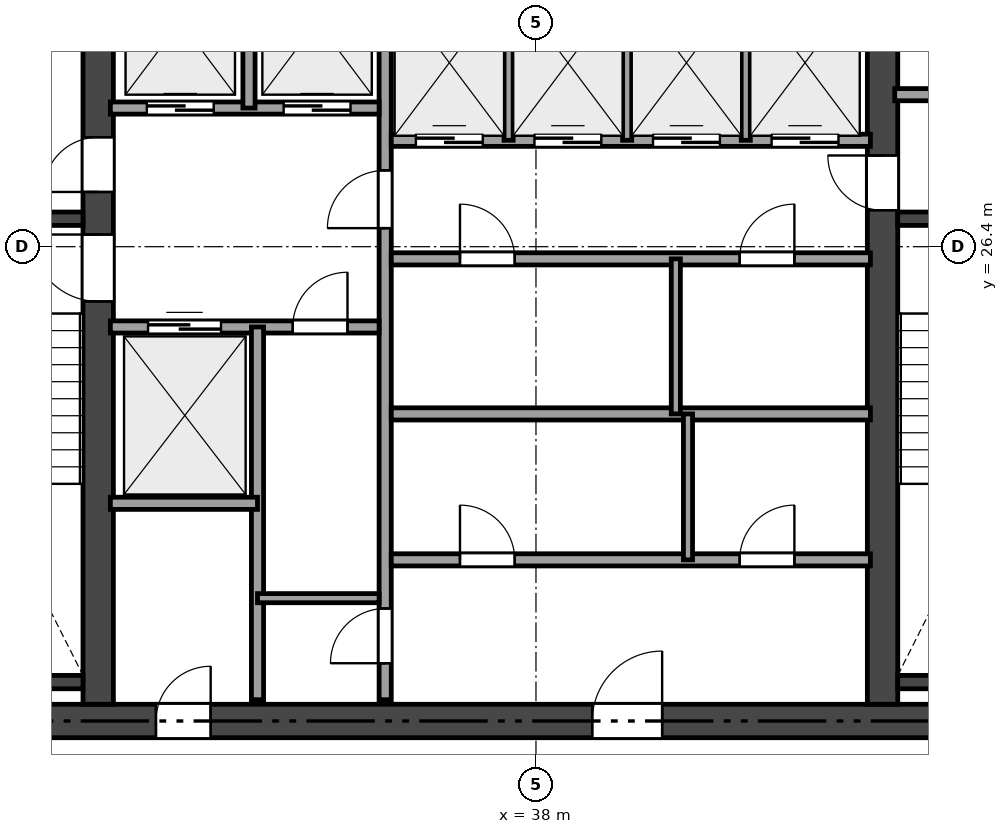
"""IFC4 building model, lengths in metres.
Left out: names, types, materials, properties, quantities, classifications, styles, units other than length and angle.
Written with IfcOpenShell. Run it as: python <this file> out.ifc"""

import sys

from ifc_helpers import new_model, si_unit, direction, frame, frame_2d, origin, place, context, subcontext, project, spatial, rectangle, extrude, element, fill, save


model = new_model("IFC4")
c1 = context("Model", 3, precision=1e-05, world=origin(), true_north=direction((0.0, 1.0)))
c2 = subcontext(c1, "Body", "Model", "MODEL_VIEW")
j1 = project(units=[si_unit("LENGTHUNIT", "METRE"), si_unit("PLANEANGLEUNIT", "RADIAN")], contexts=[c1])
p1 = place(None, origin())
s1 = spatial("IfcSite", under=j1, at=p1, CompositionType="ELEMENT")
p2 = place(p1, origin())
s2 = spatial("IfcBuilding", under=s1, at=p2, CompositionType="ELEMENT")
p3 = place(p2, frame((0.0, 0.0, 228.3)))
s3 = spatial("IfcBuildingStorey", under=s2, at=p3, CompositionType="ELEMENT", Elevation=228.3)
p4 = place(p3, frame((26.525, 18.6, 0.0), z_axis=(0.0, 0.0, 1.0), x_axis=(1.0, 0.0, 0.0)))
e1 = element("IfcWall", 1, at=p4, inside=s3, PredefinedType="SHEAR", context=c2, shape_type="SweptSolid", body=[
    extrude(rectangle(XDim=21.35, YDim=0.55, at=frame_2d((10.675, 0.0))), origin(), (0.0, 0.0, 1.0), 3.24),
])
p5 = place(p4, frame((12.4, 0.0, 0.0)))
e2 = element("IfcOpeningElement", 2, at=p5, cuts=e1, PredefinedType="OPENING", context=c2, shape_type="SweptSolid", body=[
    extrude(rectangle(XDim=1.15, YDim=2.15, at=frame_2d((0.575, 1.075))), frame((0.0, 0.285, 0.0), z_axis=(0.0, -1.0, 0.0), x_axis=(1.0, 0.0, 0.0)), (0.0, 0.0, 1.0), 0.57),
])
p6 = place(p4, frame((5.225, 0.0, 0.0)))
e3 = element("IfcOpeningElement", 3, at=p6, cuts=e1, PredefinedType="OPENING", context=c2, shape_type="SweptSolid", body=[
    extrude(rectangle(XDim=0.9, YDim=2.1, at=frame_2d((0.45, 1.05))), frame((0.0, 0.285, 0.0), z_axis=(0.0, -1.0, 0.0), x_axis=(1.0, 0.0, 0.0)), (0.0, 0.0, 1.0), 0.57),
])
p7 = place(p3, frame((30.8, 18.875, 0.0), z_axis=(0.0, 0.0, 1.0), x_axis=(0.0, 1.0, 0.0)))
e4 = element("IfcWall", 4, at=p7, inside=s3, PredefinedType="SHEAR", context=c2, shape_type="SweptSolid", body=[
    extrude(rectangle(XDim=15.05, YDim=0.5, at=frame_2d((7.525, 0.0))), origin(), (0.0, 0.0, 1.0), 3.24),
])
p8 = place(p7, frame((6.625, 0.0, 0.0)))
e5 = element("IfcOpeningElement", 5, at=p8, cuts=e4, PredefinedType="OPENING", context=c2, shape_type="SweptSolid", body=[
    extrude(rectangle(XDim=1.1, YDim=2.15, at=frame_2d((0.55, 1.075))), frame((0.0, 0.26, 0.0), z_axis=(0.0, -1.0, 0.0), x_axis=(1.0, 0.0, 0.0)), (0.0, 0.0, 1.0), 0.52),
])
p9 = place(p7, frame((8.425, 0.0, 0.0)))
e6 = element("IfcOpeningElement", 6, at=p9, cuts=e4, PredefinedType="OPENING", context=c2, shape_type="SweptSolid", body=[
    extrude(rectangle(XDim=0.9, YDim=2.1, at=frame_2d((0.45, 1.05))), frame((0.0, 0.26, 0.0), z_axis=(0.0, -1.0, 0.0), x_axis=(1.0, 0.0, 0.0)), (0.0, 0.0, 1.0), 0.52),
])
p10 = place(p3, frame((43.7, 18.875, 0.0), z_axis=(0.0, 0.0, 1.0), x_axis=(0.0, 1.0, 0.0)))
e7 = element("IfcWall", 7, at=p10, inside=s3, PredefinedType="SHEAR", context=c2, shape_type="SweptSolid", body=[
    extrude(rectangle(XDim=15.05, YDim=0.5, at=frame_2d((7.525, 0.0))), origin(), (0.0, 0.0, 1.0), 3.24),
])
p11 = place(p10, frame((8.125, 0.0, 0.0)))
e8 = element("IfcOpeningElement", 8, at=p11, cuts=e7, PredefinedType="OPENING", context=c2, shape_type="SweptSolid", body=[
    extrude(rectangle(XDim=0.9, YDim=2.1, at=frame_2d((0.45, 1.05))), frame((0.0, 0.26, 0.0), z_axis=(0.0, -1.0, 0.0), x_axis=(1.0, 0.0, 0.0)), (0.0, 0.0, 1.0), 0.52),
])
for number, where, z_axis, x_axis in (
    (9, (27.075, 26.86, 0.0), (0.0, 0.0, 1.0), (1.0, 0.0, 0.0)),
    (10, (27.075, 19.24, 0.0), (0.0, 0.0, 1.0), (1.0, 0.0, 0.0)),
):
    element("IfcWall", number, at=place(p3, frame(where, z_axis=z_axis, x_axis=x_axis)), inside=s3, PredefinedType="SHEAR", context=c2, shape_type="SweptSolid", body=[
        extrude(rectangle(XDim=3.475, YDim=0.22, at=frame_2d((1.738, 0.0))), origin(), (0.0, 0.0, 1.0), 3.24),
    ])
for number, where, z_axis, x_axis in (
    (11, (43.95, 26.86, 0.0), (0.0, 0.0, 1.0), (1.0, 0.0, 0.0)),
    (12, (43.95, 19.24, 0.0), (0.0, 0.0, 1.0), (1.0, 0.0, 0.0)),
):
    element("IfcWall", number, at=place(p3, frame(where, z_axis=z_axis, x_axis=x_axis)), inside=s3, PredefinedType="SHEAR", context=c2, shape_type="SweptSolid", body=[
        extrude(rectangle(XDim=3.375, YDim=0.22, at=frame_2d((1.688, 0.0))), origin(), (0.0, 0.0, 1.0), 3.24),
    ])
p12 = place(p3, frame((43.9, 28.9, 0.0), z_axis=(0.0, 0.0, 1.0), x_axis=(1.0, 0.0, 0.0)))
e13 = element("IfcWall", 13, at=p12, inside=s3, PredefinedType="SOLIDWALL", context=c2, shape_type="SweptSolid", body=[
    extrude(rectangle(XDim=3.35, YDim=0.2, at=frame_2d((1.675, 0.0))), origin(), (0.0, 0.0, 1.0), 3.24),
])
p13 = place(p12, frame((1.15, 0.0, 0.0)))
e14 = element("IfcOpeningElement", 14, at=p13, cuts=e13, PredefinedType="OPENING", context=c2, shape_type="SweptSolid", body=[
    extrude(rectangle(XDim=0.9, YDim=2.1, at=frame_2d((0.45, 1.05))), frame((0.0, 0.11, 0.0), z_axis=(0.0, -1.0, 0.0), x_axis=(1.0, 0.0, 0.0)), (0.0, 0.0, 1.0), 0.22),
])
p14 = place(p3, frame((35.52, 18.95, 0.0), z_axis=(0.0, 0.0, 1.0), x_axis=(0.0, 1.0, 0.0)))
e15 = element("IfcWall", 15, at=p14, inside=s3, PredefinedType="SOLIDWALL", context=c2, shape_type="SweptSolid", body=[
    extrude(rectangle(XDim=14.9, YDim=0.2, at=frame_2d((7.45, 0.0))), origin(), (0.0, 0.0, 1.0), 2.761),
])
p15 = place(p14, frame((7.755, 0.0, 0.0)))
e16 = element("IfcOpeningElement", 16, at=p15, cuts=e15, PredefinedType="OPENING", context=c2, shape_type="SweptSolid", body=[
    extrude(rectangle(XDim=0.95, YDim=2.15, at=frame_2d((0.475, 1.075))), frame((0.0, 0.11, 0.0), z_axis=(0.0, -1.0, 0.0), x_axis=(1.0, 0.0, 0.0)), (0.0, 0.0, 1.0), 0.22),
])
p16 = place(p14, frame((0.6, 0.0, 0.0)))
e17 = element("IfcOpeningElement", 17, at=p16, cuts=e15, PredefinedType="OPENING", context=c2, shape_type="SweptSolid", body=[
    extrude(rectangle(XDim=0.9, YDim=2.1, at=frame_2d((0.45, 1.05))), frame((0.0, 0.11, 0.0), z_axis=(0.0, -1.0, 0.0), x_axis=(1.0, 0.0, 0.0)), (0.0, 0.0, 1.0), 0.22),
])
p17 = place(p3, frame((31.0, 28.68, 0.0), z_axis=(0.0, 0.0, 1.0), x_axis=(1.0, 0.0, 0.0)))
e18 = element("IfcWall", 18, at=p17, inside=s3, PredefinedType="SOLIDWALL", context=c2, shape_type="SweptSolid", body=[
    extrude(rectangle(XDim=4.42, YDim=0.2, at=frame_2d((2.21, 0.0))), origin(), (0.0, 0.0, 1.0), 3.24),
])
p18 = place(p17, frame((0.6, 0.0, 0.0)))
e19 = element("IfcOpeningElement", 19, at=p18, cuts=e18, PredefinedType="OPENING", context=c2, shape_type="SweptSolid", body=[
    extrude(rectangle(XDim=1.1, YDim=2.15, at=frame_2d((0.55, 1.075))), frame((0.0, 0.11, 0.0), z_axis=(0.0, -1.0, 0.0), x_axis=(1.0, 0.0, 0.0)), (0.0, 0.0, 1.0), 0.22),
])
p19 = place(p17, frame((2.85, 0.0, 0.0)))
e20 = element("IfcOpeningElement", 20, at=p19, cuts=e18, PredefinedType="OPENING", context=c2, shape_type="SweptSolid", body=[
    extrude(rectangle(XDim=1.1, YDim=2.15, at=frame_2d((0.55, 1.075))), frame((0.0, 0.11, 0.0), z_axis=(0.0, -1.0, 0.0), x_axis=(1.0, 0.0, 0.0)), (0.0, 0.0, 1.0), 0.22),
])
p20 = place(p3, frame((33.28, 28.68, 0.0), z_axis=(0.0, 0.0, 1.0), x_axis=(0.0, 1.0, 0.0)))
e21 = element("IfcWall", 21, at=p20, inside=s3, PredefinedType="SOLIDWALL", context=c2, shape_type="SweptSolid", body=[
    extrude(rectangle(XDim=2.82, YDim=0.2, at=frame_2d((1.41, 0.0))), origin(), (0.0, 0.0, 1.0), 3.24),
])
p21 = place(p3, frame((31.0, 25.08, 0.0), z_axis=(0.0, 0.0, 1.0), x_axis=(1.0, 0.0, 0.0)))
e22 = element("IfcWall", 22, at=p21, inside=s3, PredefinedType="SOLIDWALL", context=c2, shape_type="SweptSolid", body=[
    extrude(rectangle(XDim=4.42, YDim=0.2, at=frame_2d((2.21, 0.0))), origin(), (0.0, 0.0, 1.0), 3.24),
])
p22 = place(p21, frame((3.0, 0.0, 0.0)))
e23 = element("IfcOpeningElement", 23, at=p22, cuts=e22, PredefinedType="OPENING", context=c2, shape_type="SweptSolid", body=[
    extrude(rectangle(XDim=0.9, YDim=2.1, at=frame_2d((0.45, 1.05))), frame((0.0, 0.11, 0.0), z_axis=(0.0, -1.0, 0.0), x_axis=(1.0, 0.0, 0.0)), (0.0, 0.0, 1.0), 0.22),
])
p23 = place(p21, frame((0.62, 0.0, 0.0)))
e24 = element("IfcOpeningElement", 24, at=p23, cuts=e22, PredefinedType="OPENING", context=c2, shape_type="SweptSolid", body=[
    extrude(rectangle(XDim=1.2, YDim=2.15, at=frame_2d((0.6, 1.075))), frame((0.0, 0.11, 0.0), z_axis=(0.0, -1.0, 0.0), x_axis=(1.0, 0.0, 0.0)), (0.0, 0.0, 1.0), 0.22),
])
p24 = place(p3, frame((33.42, 18.95, 0.0), z_axis=(0.0, 0.0, 1.0), x_axis=(0.0, 1.0, 0.0)))
e25 = element("IfcWall", 25, at=p24, inside=s3, PredefinedType="SOLIDWALL", context=c2, shape_type="SweptSolid", body=[
    extrude(rectangle(XDim=6.13, YDim=0.2, at=frame_2d((3.065, 0.0))), origin(), (0.0, 0.0, 1.0), 2.761),
])
p25 = place(p3, frame((31.0, 22.18, 0.0), z_axis=(0.0, 0.0, 1.0), x_axis=(1.0, 0.0, 0.0)))
e26 = element("IfcWall", 26, at=p25, inside=s3, PredefinedType="SOLIDWALL", context=c2, shape_type="SweptSolid", body=[
    extrude(rectangle(XDim=2.42, YDim=0.2, at=frame_2d((1.21, 0.0))), origin(), (0.0, 0.0, 1.0), 3.24),
])
p26 = place(p3, frame((33.42, 20.62, 0.0), z_axis=(0.0, 0.0, 1.0), x_axis=(1.0, 0.0, 0.0)))
e27 = element("IfcWall", 27, at=p26, inside=s3, PredefinedType="PARTITIONING", context=c2, shape_type="SweptSolid", body=[
    extrude(rectangle(XDim=2.0, YDim=0.15, at=frame_2d((1.0, 0.0))), origin(), (0.0, 0.0, 1.0), 3.24),
])
p27 = place(p3, frame((35.62, 28.15, 0.0), z_axis=(0.0, 0.0, 1.0), x_axis=(1.0, 0.0, 0.0)))
e28 = element("IfcWall", 28, at=p27, inside=s3, PredefinedType="SOLIDWALL", context=c2, shape_type="SweptSolid", body=[
    extrude(rectangle(XDim=7.88, YDim=0.2, at=frame_2d((3.94, 0.0))), origin(), (0.0, 0.0, 1.0), 3.24),
])
p28 = place(p27, frame((0.405, 0.0, 0.0)))
e29 = element("IfcOpeningElement", 29, at=p28, cuts=e28, PredefinedType="OPENING", context=c2, shape_type="SweptSolid", body=[
    extrude(rectangle(XDim=1.1, YDim=2.15, at=frame_2d((0.55, 1.075))), frame((0.0, 0.11, 0.0), z_axis=(0.0, -1.0, 0.0), x_axis=(1.0, 0.0, 0.0)), (0.0, 0.0, 1.0), 0.22),
])
p29 = place(p27, frame((2.355, 0.0, 0.0)))
e30 = element("IfcOpeningElement", 30, at=p29, cuts=e28, PredefinedType="OPENING", context=c2, shape_type="SweptSolid", body=[
    extrude(rectangle(XDim=1.1, YDim=2.15, at=frame_2d((0.55, 1.075))), frame((0.0, 0.11, 0.0), z_axis=(0.0, -1.0, 0.0), x_axis=(1.0, 0.0, 0.0)), (0.0, 0.0, 1.0), 0.22),
])
p30 = place(p27, frame((4.305, 0.0, 0.0)))
e31 = element("IfcOpeningElement", 31, at=p30, cuts=e28, PredefinedType="OPENING", context=c2, shape_type="SweptSolid", body=[
    extrude(rectangle(XDim=1.1, YDim=2.15, at=frame_2d((0.55, 1.075))), frame((0.0, 0.11, 0.0), z_axis=(0.0, -1.0, 0.0), x_axis=(1.0, 0.0, 0.0)), (0.0, 0.0, 1.0), 0.22),
])
p31 = place(p27, frame((6.255, 0.0, 0.0)))
e32 = element("IfcOpeningElement", 32, at=p31, cuts=e28, PredefinedType="OPENING", context=c2, shape_type="SweptSolid", body=[
    extrude(rectangle(XDim=1.1, YDim=2.15, at=frame_2d((0.55, 1.075))), frame((0.0, 0.11, 0.0), z_axis=(0.0, -1.0, 0.0), x_axis=(1.0, 0.0, 0.0)), (0.0, 0.0, 1.0), 0.22),
])
p32 = place(p3, frame((35.62, 26.2, 0.0), z_axis=(0.0, 0.0, 1.0), x_axis=(1.0, 0.0, 0.0)))
e33 = element("IfcWall", 33, at=p32, inside=s3, PredefinedType="SOLIDWALL", context=c2, shape_type="SweptSolid", body=[
    extrude(rectangle(XDim=7.88, YDim=0.2, at=frame_2d((3.94, 0.0))), origin(), (0.0, 0.0, 1.0), 3.24),
])
p33 = place(p32, frame((1.13, 0.0, 0.0)))
e34 = element("IfcOpeningElement", 34, at=p33, cuts=e33, PredefinedType="OPENING", context=c2, shape_type="SweptSolid", body=[
    extrude(rectangle(XDim=0.9, YDim=2.1, at=frame_2d((0.45, 1.05))), frame((0.0, 0.11, 0.0), z_axis=(0.0, -1.0, 0.0), x_axis=(1.0, 0.0, 0.0)), (0.0, 0.0, 1.0), 0.22),
])
p34 = place(p32, frame((5.73, 0.0, 0.0)))
e35 = element("IfcOpeningElement", 35, at=p34, cuts=e33, PredefinedType="OPENING", context=c2, shape_type="SweptSolid", body=[
    extrude(rectangle(XDim=0.9, YDim=2.1, at=frame_2d((0.45, 1.05))), frame((0.0, 0.11, 0.0), z_axis=(0.0, -1.0, 0.0), x_axis=(1.0, 0.0, 0.0)), (0.0, 0.0, 1.0), 0.22),
])
p35 = place(p3, frame((35.62, 23.65, 0.0), z_axis=(0.0, 0.0, 1.0), x_axis=(1.0, 0.0, 0.0)))
e36 = element("IfcWall", 36, at=p35, inside=s3, PredefinedType="SOLIDWALL", context=c2, shape_type="SweptSolid", body=[
    extrude(rectangle(XDim=7.88, YDim=0.2, at=frame_2d((3.94, 0.0))), origin(), (0.0, 0.0, 1.0), 2.761),
])
p36 = place(p3, frame((35.62, 21.25, 0.0), z_axis=(0.0, 0.0, 1.0), x_axis=(1.0, 0.0, 0.0)))
e37 = element("IfcWall", 37, at=p36, inside=s3, PredefinedType="SOLIDWALL", context=c2, shape_type="SweptSolid", body=[
    extrude(rectangle(XDim=7.88, YDim=0.2, at=frame_2d((3.94, 0.0))), origin(), (0.0, 0.0, 1.0), 3.24),
])
p37 = place(p36, frame((1.13, 0.0, 0.0)))
e38 = element("IfcOpeningElement", 38, at=p37, cuts=e37, PredefinedType="OPENING", context=c2, shape_type="SweptSolid", body=[
    extrude(rectangle(XDim=0.9, YDim=2.1, at=frame_2d((0.45, 1.05))), frame((0.0, 0.11, 0.0), z_axis=(0.0, -1.0, 0.0), x_axis=(1.0, 0.0, 0.0)), (0.0, 0.0, 1.0), 0.22),
])
p38 = place(p36, frame((5.73, 0.0, 0.0)))
e39 = element("IfcOpeningElement", 39, at=p38, cuts=e37, PredefinedType="OPENING", context=c2, shape_type="SweptSolid", body=[
    extrude(rectangle(XDim=0.9, YDim=2.1, at=frame_2d((0.45, 1.05))), frame((0.0, 0.11, 0.0), z_axis=(0.0, -1.0, 0.0), x_axis=(1.0, 0.0, 0.0)), (0.0, 0.0, 1.0), 0.22),
])
for number, where, z_axis, x_axis in (
    (40, (37.55, 28.15, 0.0), (0.0, 0.0, 1.0), (0.0, 1.0, 0.0)),
    (41, (39.5, 28.15, 0.0), (0.0, 0.0, 1.0), (0.0, 1.0, 0.0)),
    (42, (41.45, 28.15, 0.0), (0.0, 0.0, 1.0), (0.0, 1.0, 0.0)),
):
    element("IfcWall", number, at=place(p3, frame(where, z_axis=z_axis, x_axis=x_axis)), inside=s3, PredefinedType="PARTITIONING", context=c2, shape_type="SweptSolid", body=[
        extrude(rectangle(XDim=2.43, YDim=0.15, at=frame_2d((1.215, 0.0))), origin(), (0.0, 0.0, 1.0), 3.24),
    ])
p39 = place(p3, frame((40.3, 23.65, 0.0), z_axis=(0.0, 0.0, 1.0), x_axis=(0.0, 1.0, 0.0)))
e43 = element("IfcWall", 43, at=p39, inside=s3, PredefinedType="PARTITIONING", context=c2, shape_type="SweptSolid", body=[
    extrude(rectangle(XDim=2.55, YDim=0.15, at=frame_2d((1.275, 0.0))), origin(), (0.0, 0.0, 1.0), 2.761),
])
p40 = place(p3, frame((40.5, 21.25, 0.0), z_axis=(0.0, 0.0, 1.0), x_axis=(0.0, 1.0, 0.0)))
e44 = element("IfcWall", 44, at=p40, inside=s3, PredefinedType="PARTITIONING", context=c2, shape_type="SweptSolid", body=[
    extrude(rectangle(XDim=2.4, YDim=0.15, at=frame_2d((1.2, 0.0))), origin(), (0.0, 0.0, 1.0), 2.761),
])
p41 = place(p8, origin())
e45 = element("IfcDoor", 45, at=p41, inside=s3, OperationType="SINGLE_SWING_RIGHT", PredefinedType="DOOR", context=c2, shape_type="SweptSolid", body=[
    extrude(rectangle(XDim=1.1, YDim=2.15, at=frame_2d((0.55, 1.075))), frame((0.0, 0.025, 0.0), z_axis=(0.0, -1.0, 0.0), x_axis=(1.0, 0.0, 0.0)), (0.0, 0.0, 1.0), 0.05),
])
fill(e5, e45)
p42 = place(p15, origin())
e46 = element("IfcDoor", 46, at=p42, inside=s3, OperationType="SINGLE_SWING_LEFT", PredefinedType="DOOR", context=c2, shape_type="SweptSolid", body=[
    extrude(rectangle(XDim=0.95, YDim=2.15, at=frame_2d((0.475, 1.075))), frame((0.0, 0.025, 0.0), z_axis=(0.0, -1.0, 0.0), x_axis=(1.0, 0.0, 0.0)), (0.0, 0.0, 1.0), 0.05),
])
fill(e16, e46)
p43 = place(p11, origin())
e47 = element("IfcDoor", 47, at=p43, inside=s3, OperationType="SINGLE_SWING_RIGHT", PredefinedType="DOOR", context=c2, shape_type="SweptSolid", body=[
    extrude(rectangle(XDim=0.9, YDim=2.1, at=frame_2d((0.45, 1.05))), frame((0.0, 0.025, 0.0), z_axis=(0.0, -1.0, 0.0), x_axis=(1.0, 0.0, 0.0)), (0.0, 0.0, 1.0), 0.05),
])
fill(e8, e47)
p44 = place(p5, origin())
e48 = element("IfcDoor", 48, at=p44, inside=s3, OperationType="SINGLE_SWING_RIGHT", PredefinedType="DOOR", context=c2, shape_type="SweptSolid", body=[
    extrude(rectangle(XDim=1.15, YDim=2.15, at=frame_2d((0.575, 1.075))), frame((0.0, 0.025, 0.0), z_axis=(0.0, -1.0, 0.0), x_axis=(1.0, 0.0, 0.0)), (0.0, 0.0, 1.0), 0.05),
])
fill(e2, e48)
p45 = place(p9, origin())
e49 = element("IfcDoor", 49, at=p45, inside=s3, OperationType="SINGLE_SWING_LEFT", PredefinedType="DOOR", context=c2, shape_type="SweptSolid", body=[
    extrude(rectangle(XDim=0.9, YDim=2.1, at=frame_2d((0.45, 1.05))), frame((0.0, 0.025, 0.0), z_axis=(0.0, -1.0, 0.0), x_axis=(1.0, 0.0, 0.0)), (0.0, 0.0, 1.0), 0.05),
])
fill(e6, e49)
p46 = place(p6, origin())
e50 = element("IfcDoor", 50, at=p46, inside=s3, OperationType="SINGLE_SWING_RIGHT", PredefinedType="DOOR", context=c2, shape_type="SweptSolid", body=[
    extrude(rectangle(XDim=0.9, YDim=2.1, at=frame_2d((0.45, 1.05))), frame((0.0, 0.025, 0.0), z_axis=(0.0, -1.0, 0.0), x_axis=(1.0, 0.0, 0.0)), (0.0, 0.0, 1.0), 0.05),
])
fill(e3, e50)
p47 = place(p16, origin())
e51 = element("IfcDoor", 51, at=p47, inside=s3, OperationType="SINGLE_SWING_LEFT", PredefinedType="DOOR", context=c2, shape_type="SweptSolid", body=[
    extrude(rectangle(XDim=0.9, YDim=2.1, at=frame_2d((0.45, 1.05))), frame((0.0, 0.025, 0.0), z_axis=(0.0, -1.0, 0.0), x_axis=(1.0, 0.0, 0.0)), (0.0, 0.0, 1.0), 0.05),
])
fill(e17, e51)
p48 = place(p22, origin())
e52 = element("IfcDoor", 52, at=p48, inside=s3, OperationType="SINGLE_SWING_RIGHT", PredefinedType="DOOR", context=c2, shape_type="SweptSolid", body=[
    extrude(rectangle(XDim=0.9, YDim=2.1, at=frame_2d((0.45, 1.05))), frame((0.0, 0.025, 0.0), z_axis=(0.0, -1.0, 0.0), x_axis=(1.0, 0.0, 0.0)), (0.0, 0.0, 1.0), 0.05),
])
fill(e23, e52)
p49 = place(p37, origin())
e53 = element("IfcDoor", 53, at=p49, inside=s3, OperationType="SINGLE_SWING_LEFT", PredefinedType="DOOR", context=c2, shape_type="SweptSolid", body=[
    extrude(rectangle(XDim=0.9, YDim=2.1, at=frame_2d((0.45, 1.05))), frame((0.0, 0.025, 0.0), z_axis=(0.0, -1.0, 0.0), x_axis=(1.0, 0.0, 0.0)), (0.0, 0.0, 1.0), 0.05),
])
fill(e38, e53)
p50 = place(p38, origin())
e54 = element("IfcDoor", 54, at=p50, inside=s3, OperationType="SINGLE_SWING_RIGHT", PredefinedType="DOOR", context=c2, shape_type="SweptSolid", body=[
    extrude(rectangle(XDim=0.9, YDim=2.1, at=frame_2d((0.45, 1.05))), frame((0.0, 0.025, 0.0), z_axis=(0.0, -1.0, 0.0), x_axis=(1.0, 0.0, 0.0)), (0.0, 0.0, 1.0), 0.05),
])
fill(e39, e54)
p51 = place(p33, origin())
e55 = element("IfcDoor", 55, at=p51, inside=s3, OperationType="SINGLE_SWING_LEFT", PredefinedType="DOOR", context=c2, shape_type="SweptSolid", body=[
    extrude(rectangle(XDim=0.9, YDim=2.1, at=frame_2d((0.45, 1.05))), frame((0.0, 0.025, 0.0), z_axis=(0.0, -1.0, 0.0), x_axis=(1.0, 0.0, 0.0)), (0.0, 0.0, 1.0), 0.05),
])
fill(e34, e55)
p52 = place(p34, origin())
e56 = element("IfcDoor", 56, at=p52, inside=s3, OperationType="SINGLE_SWING_RIGHT", PredefinedType="DOOR", context=c2, shape_type="SweptSolid", body=[
    extrude(rectangle(XDim=0.9, YDim=2.1, at=frame_2d((0.45, 1.05))), frame((0.0, 0.025, 0.0), z_axis=(0.0, -1.0, 0.0), x_axis=(1.0, 0.0, 0.0)), (0.0, 0.0, 1.0), 0.05),
])
fill(e35, e56)
p53 = place(p18, origin())
e57 = element("IfcDoor", 57, at=p53, inside=s3, OperationType="SLIDING_TO_LEFT", PredefinedType="DOOR", context=c2, shape_type="SweptSolid", body=[
    extrude(rectangle(XDim=1.1, YDim=2.15, at=frame_2d((0.55, 1.075))), frame((0.0, 0.025, 0.0), z_axis=(0.0, -1.0, 0.0), x_axis=(1.0, 0.0, 0.0)), (0.0, 0.0, 1.0), 0.05),
])
fill(e19, e57)
p54 = place(p19, origin())
e58 = element("IfcDoor", 58, at=p54, inside=s3, OperationType="SLIDING_TO_LEFT", PredefinedType="DOOR", context=c2, shape_type="SweptSolid", body=[
    extrude(rectangle(XDim=1.1, YDim=2.15, at=frame_2d((0.55, 1.075))), frame((0.0, 0.025, 0.0), z_axis=(0.0, -1.0, 0.0), x_axis=(1.0, 0.0, 0.0)), (0.0, 0.0, 1.0), 0.05),
])
fill(e20, e58)
p55 = place(p23, origin())
e59 = element("IfcDoor", 59, at=p55, inside=s3, OperationType="SLIDING_TO_LEFT", PredefinedType="DOOR", context=c2, shape_type="SweptSolid", body=[
    extrude(rectangle(XDim=1.2, YDim=2.15, at=frame_2d((0.6, 1.075))), frame((0.0, 0.025, 0.0), z_axis=(0.0, -1.0, 0.0), x_axis=(1.0, 0.0, 0.0)), (0.0, 0.0, 1.0), 0.05),
])
fill(e24, e59)
p56 = place(p28, origin())
e60 = element("IfcDoor", 60, at=p56, inside=s3, OperationType="SLIDING_TO_LEFT", PredefinedType="DOOR", context=c2, shape_type="SweptSolid", body=[
    extrude(rectangle(XDim=1.1, YDim=2.15, at=frame_2d((0.55, 1.075))), frame((0.0, 0.025, 0.0), z_axis=(0.0, -1.0, 0.0), x_axis=(1.0, 0.0, 0.0)), (0.0, 0.0, 1.0), 0.05),
])
fill(e29, e60)
p57 = place(p29, origin())
e61 = element("IfcDoor", 61, at=p57, inside=s3, OperationType="SLIDING_TO_LEFT", PredefinedType="DOOR", context=c2, shape_type="SweptSolid", body=[
    extrude(rectangle(XDim=1.1, YDim=2.15, at=frame_2d((0.55, 1.075))), frame((0.0, 0.025, 0.0), z_axis=(0.0, -1.0, 0.0), x_axis=(1.0, 0.0, 0.0)), (0.0, 0.0, 1.0), 0.05),
])
fill(e30, e61)
p58 = place(p30, origin())
e62 = element("IfcDoor", 62, at=p58, inside=s3, OperationType="SLIDING_TO_LEFT", PredefinedType="DOOR", context=c2, shape_type="SweptSolid", body=[
    extrude(rectangle(XDim=1.1, YDim=2.15, at=frame_2d((0.55, 1.075))), frame((0.0, 0.025, 0.0), z_axis=(0.0, -1.0, 0.0), x_axis=(1.0, 0.0, 0.0)), (0.0, 0.0, 1.0), 0.05),
])
fill(e31, e62)
p59 = place(p31, origin())
e63 = element("IfcDoor", 63, at=p59, inside=s3, OperationType="SLIDING_TO_LEFT", PredefinedType="DOOR", context=c2, shape_type="SweptSolid", body=[
    extrude(rectangle(XDim=1.1, YDim=2.15, at=frame_2d((0.55, 1.075))), frame((0.0, 0.025, 0.0), z_axis=(0.0, -1.0, 0.0), x_axis=(1.0, 0.0, 0.0)), (0.0, 0.0, 1.0), 0.05),
])
fill(e32, e63)
save(model, sys.argv[1])
